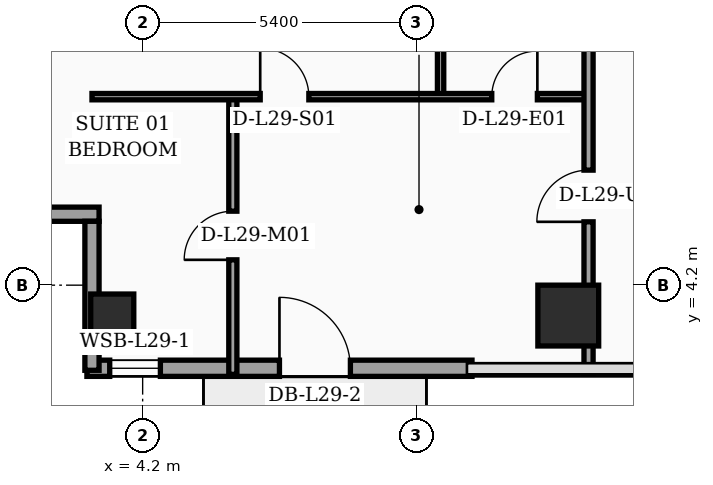
"""IFC4 building model, lengths in metres.
Left out: names, types, materials, properties, quantities, classifications, styles, units other than length and angle.
Written with IfcOpenShell. Run it as: python <this file> out.ifc"""

import sys

from ifc_helpers import new_model, si_unit, direction, frame, frame_2d, origin, origin_2d, place, context, subcontext, project, spatial, rectangle, hollow_rectangle, extrude, element, fill, save


model = new_model("IFC4")
c1 = context("Model", 3, precision=1e-05, world=origin(), true_north=direction((0.0, 1.0)))
c2 = subcontext(c1, "Body", "Model", "MODEL_VIEW")
j1 = project(units=[si_unit("LENGTHUNIT", "METRE"), si_unit("PLANEANGLEUNIT", "RADIAN")], contexts=[c1])
p1 = place(None, origin())
s1 = spatial("IfcSite", under=j1, at=p1, CompositionType="ELEMENT")
p2 = place(p1, origin())
s2 = spatial("IfcBuilding", under=s1, at=p2, CompositionType="ELEMENT")
p3 = place(p2, frame((0.0, 0.0, 120.2)))
s3 = spatial("IfcBuildingStorey", under=s2, at=p3, CompositionType="ELEMENT", Elevation=120.2)
p4 = place(p3, frame((3.6, 3.6, 0.0), z_axis=(0.0, 0.0, 1.0), x_axis=(1.0, 0.0, 0.0)))
e1 = element("IfcColumn", 1, at=p4, inside=s3, PredefinedType="COLUMN", context=c2, shape_type="SweptSolid", body=[
    extrude(hollow_rectangle(XDim=0.85, YDim=0.85, WallThickness=0.036, at=origin_2d()), origin(), (0.0, 0.0, 1.0), 3.56),
])
p5 = place(p3, frame((12.6, 3.6, 0.0), z_axis=(0.0, 0.0, 1.0), x_axis=(1.0, 0.0, 0.0)))
e2 = element("IfcColumn", 2, at=p5, inside=s3, PredefinedType="COLUMN", context=c2, shape_type="SweptSolid", body=[
    extrude(rectangle(XDim=1.2, YDim=1.2, at=origin_2d()), origin(), (0.0, 0.0, 1.0), 3.56),
])
p6 = place(p3, frame((3.1, 2.56, 0.0), z_axis=(0.0, 0.0, 1.0), x_axis=(1.0, 0.0, 0.0)))
e3 = element("IfcWall", 3, at=p6, inside=s3, PredefinedType="SOLIDWALL", context=c2, shape_type="SweptSolid", body=[
    extrude(rectangle(XDim=7.6, YDim=0.32, at=frame_2d((3.8, 0.0))), origin(), (0.0, 0.0, 1.0), 3.56),
])
p7 = place(p6, frame((0.45, 0.0, 0.75)))
e4 = element("IfcOpeningElement", 4, at=p7, cuts=e3, PredefinedType="OPENING", context=c2, shape_type="SweptSolid", body=[
    extrude(rectangle(XDim=1.0, YDim=1.6, at=frame_2d((0.5, 0.8))), frame((0.0, 0.17, 0.0), z_axis=(0.0, -1.0, 0.0), x_axis=(1.0, 0.0, 0.0)), (0.0, 0.0, 1.0), 0.34),
])
p8 = place(p6, frame((3.8, 0.0, 0.0)))
e5 = element("IfcOpeningElement", 5, at=p8, cuts=e3, PredefinedType="OPENING", context=c2, shape_type="SweptSolid", body=[
    extrude(rectangle(XDim=1.4, YDim=2.25, at=frame_2d((0.7, 1.125))), frame((0.0, 0.17, 0.0), z_axis=(0.0, -1.0, 0.0), x_axis=(1.0, 0.0, 0.0)), (0.0, 0.0, 1.0), 0.34),
])
p9 = place(p3, frame((0.12, 5.6, 0.0), z_axis=(0.0, 0.0, 1.0), x_axis=(1.0, 0.0, 0.0)))
e6 = element("IfcWall", 6, at=p9, inside=s3, PredefinedType="SOLIDWALL", context=c2, shape_type="SweptSolid", body=[
    extrude(rectangle(XDim=3.22, YDim=0.28, at=frame_2d((1.61, 0.0))), origin(), (0.0, 0.0, 1.0), 2.84),
])
p10 = place(p3, frame((3.2, 5.46, 0.0), z_axis=(0.0, 0.0, 1.0), x_axis=(0.0, -1.0, 0.0)))
e7 = element("IfcWall", 7, at=p10, inside=s3, PredefinedType="SOLIDWALL", context=c2, shape_type="SweptSolid", body=[
    extrude(rectangle(XDim=2.94, YDim=0.28, at=frame_2d((1.47, 0.0))), origin(), (0.0, 0.0, 1.0), 2.84),
])
p11 = place(p3, frame((10.08, 7.92, 0.0), z_axis=(0.0, 0.0, 1.0), x_axis=(0.0, 1.0, 0.0)))
e8 = element("IfcWall", 8, at=p11, inside=s3, PredefinedType="PARTITIONING", context=c2, shape_type="SweptSolid", body=[
    extrude(rectangle(XDim=1.93, YDim=0.125, at=frame_2d((0.965, 0.0))), origin(), (0.0, 0.0, 1.0), 3.09),
])
p12 = place(p3, frame((5.98, 2.44, 0.0), z_axis=(0.0, 0.0, 1.0), x_axis=(0.0, 1.0, 0.0)))
e9 = element("IfcWall", 9, at=p12, inside=s3, PredefinedType="PARTITIONING", context=c2, shape_type="SweptSolid", body=[
    extrude(rectangle(XDim=5.48, YDim=0.16, at=frame_2d((2.74, 0.0))), origin(), (0.0, 0.0, 1.0), 3.04),
])
p13 = place(p12, frame((2.26, 0.0, 0.0)))
e10 = element("IfcOpeningElement", 10, at=p13, cuts=e9, PredefinedType="OPENING", context=c2, shape_type="SweptSolid", body=[
    extrude(rectangle(XDim=0.96, YDim=2.2, at=frame_2d((0.48, 1.1))), frame((0.0, 0.09, 0.0), z_axis=(0.0, -1.0, 0.0), x_axis=(1.0, 0.0, 0.0)), (0.0, 0.0, 1.0), 0.18),
])
p14 = place(p3, frame((3.2, 7.92, 0.0), z_axis=(0.0, 0.0, 1.0), x_axis=(1.0, 0.0, 0.0)))
e11 = element("IfcWall", 11, at=p14, inside=s3, PredefinedType="PARTITIONING", context=c2, shape_type="SweptSolid", body=[
    extrude(rectangle(XDim=9.8, YDim=0.125, at=frame_2d((4.9, 0.0))), origin(), (0.0, 0.0, 1.0), 2.84),
])
p15 = place(p14, frame((3.32, 0.0, 0.0)))
e12 = element("IfcOpeningElement", 12, at=p15, cuts=e11, PredefinedType="OPENING", context=c2, shape_type="SweptSolid", body=[
    extrude(rectangle(XDim=0.96, YDim=2.2, at=frame_2d((0.48, 1.1))), frame((0.0, 0.073, 0.0), z_axis=(0.0, -1.0, 0.0), x_axis=(1.0, 0.0, 0.0)), (0.0, 0.0, 1.0), 0.145),
])
p16 = place(p14, frame((7.89, 0.0, 0.0)))
e13 = element("IfcOpeningElement", 13, at=p16, cuts=e11, PredefinedType="OPENING", context=c2, shape_type="SweptSolid", body=[
    extrude(rectangle(XDim=0.9, YDim=2.15, at=frame_2d((0.45, 1.075))), frame((0.0, 0.073, 0.0), z_axis=(0.0, -1.0, 0.0), x_axis=(1.0, 0.0, 0.0)), (0.0, 0.0, 1.0), 0.145),
])
p17 = place(p3, frame((13.0, 2.44, 0.0), z_axis=(0.0, 0.0, 1.0), x_axis=(0.0, 1.0, 0.0)))
e14 = element("IfcWall", 14, at=p17, inside=s3, PredefinedType="PARTITIONING", context=c2, shape_type="SweptSolid", body=[
    extrude(rectangle(XDim=14.36, YDim=0.18, at=frame_2d((7.18, 0.0))), origin(), (0.0, 0.0, 1.0), 2.84),
])
p18 = place(p17, frame((3.01, 0.0, 0.0)))
e15 = element("IfcOpeningElement", 15, at=p18, cuts=e14, PredefinedType="OPENING", context=c2, shape_type="SweptSolid", body=[
    extrude(rectangle(XDim=1.02, YDim=2.2, at=frame_2d((0.51, 1.1))), frame((0.0, 0.1, 0.0), z_axis=(0.0, -1.0, 0.0), x_axis=(1.0, 0.0, 0.0)), (0.0, 0.0, 1.0), 0.2),
])
p19 = place(p17, frame((9.35, 0.0, 0.0)))
e16 = element("IfcOpeningElement", 16, at=p19, cuts=e14, PredefinedType="OPENING", context=c2, shape_type="SweptSolid", body=[
    extrude(rectangle(XDim=1.02, YDim=2.2, at=frame_2d((0.51, 1.1))), frame((0.0, 0.1, 0.0), z_axis=(0.0, -1.0, 0.0), x_axis=(1.0, 0.0, 0.0)), (0.0, 0.0, 1.0), 0.2),
])
p20 = place(p7, origin())
e17 = element("IfcWindow", 17, at=p20, inside=s3, PartitioningType="SINGLE_PANEL", PredefinedType="WINDOW", context=c2, shape_type="SweptSolid", body=[
    extrude(rectangle(XDim=1.0, YDim=1.6, at=frame_2d((0.5, 0.8))), frame((0.0, 0.03, 0.0), z_axis=(0.0, -1.0, 0.0), x_axis=(1.0, 0.0, 0.0)), (0.0, 0.0, 1.0), 0.06),
])
fill(e4, e17)
p21 = place(p8, origin())
e18 = element("IfcDoor", 18, at=p21, inside=s3, OperationType="SINGLE_SWING_LEFT", PredefinedType="DOOR", context=c2, shape_type="SweptSolid", body=[
    extrude(rectangle(XDim=1.4, YDim=2.25, at=frame_2d((0.7, 1.125))), frame((0.0, 0.025, 0.0), z_axis=(0.0, -1.0, 0.0), x_axis=(1.0, 0.0, 0.0)), (0.0, 0.0, 1.0), 0.05),
])
fill(e5, e18)
p22 = place(p13, origin())
e19 = element("IfcDoor", 19, at=p22, inside=s3, OperationType="SINGLE_SWING_LEFT", PredefinedType="DOOR", context=c2, shape_type="SweptSolid", body=[
    extrude(rectangle(XDim=0.96, YDim=2.2, at=frame_2d((0.48, 1.1))), frame((0.0, 0.025, 0.0), z_axis=(0.0, -1.0, 0.0), x_axis=(1.0, 0.0, 0.0)), (0.0, 0.0, 1.0), 0.05),
])
fill(e10, e19)
p23 = place(p15, origin())
e20 = element("IfcDoor", 20, at=p23, inside=s3, OperationType="SINGLE_SWING_LEFT", PredefinedType="DOOR", context=c2, shape_type="SweptSolid", body=[
    extrude(rectangle(XDim=0.96, YDim=2.2, at=frame_2d((0.48, 1.1))), frame((0.0, 0.025, 0.0), z_axis=(0.0, -1.0, 0.0), x_axis=(1.0, 0.0, 0.0)), (0.0, 0.0, 1.0), 0.05),
])
fill(e12, e20)
p24 = place(p16, origin())
e21 = element("IfcDoor", 21, at=p24, inside=s3, OperationType="SINGLE_SWING_RIGHT", PredefinedType="DOOR", context=c2, shape_type="SweptSolid", body=[
    extrude(rectangle(XDim=0.9, YDim=2.15, at=frame_2d((0.45, 1.075))), frame((0.0, 0.025, 0.0), z_axis=(0.0, -1.0, 0.0), x_axis=(1.0, 0.0, 0.0)), (0.0, 0.0, 1.0), 0.05),
])
fill(e13, e21)
p25 = place(p18, origin())
e22 = element("IfcDoor", 22, at=p25, inside=s3, OperationType="SINGLE_SWING_LEFT", PredefinedType="DOOR", context=c2, shape_type="SweptSolid", body=[
    extrude(rectangle(XDim=1.02, YDim=2.2, at=frame_2d((0.51, 1.1))), frame((0.0, 0.025, 0.0), z_axis=(0.0, -1.0, 0.0), x_axis=(1.0, 0.0, 0.0)), (0.0, 0.0, 1.0), 0.05),
])
fill(e15, e22)
save(model, sys.argv[1])
